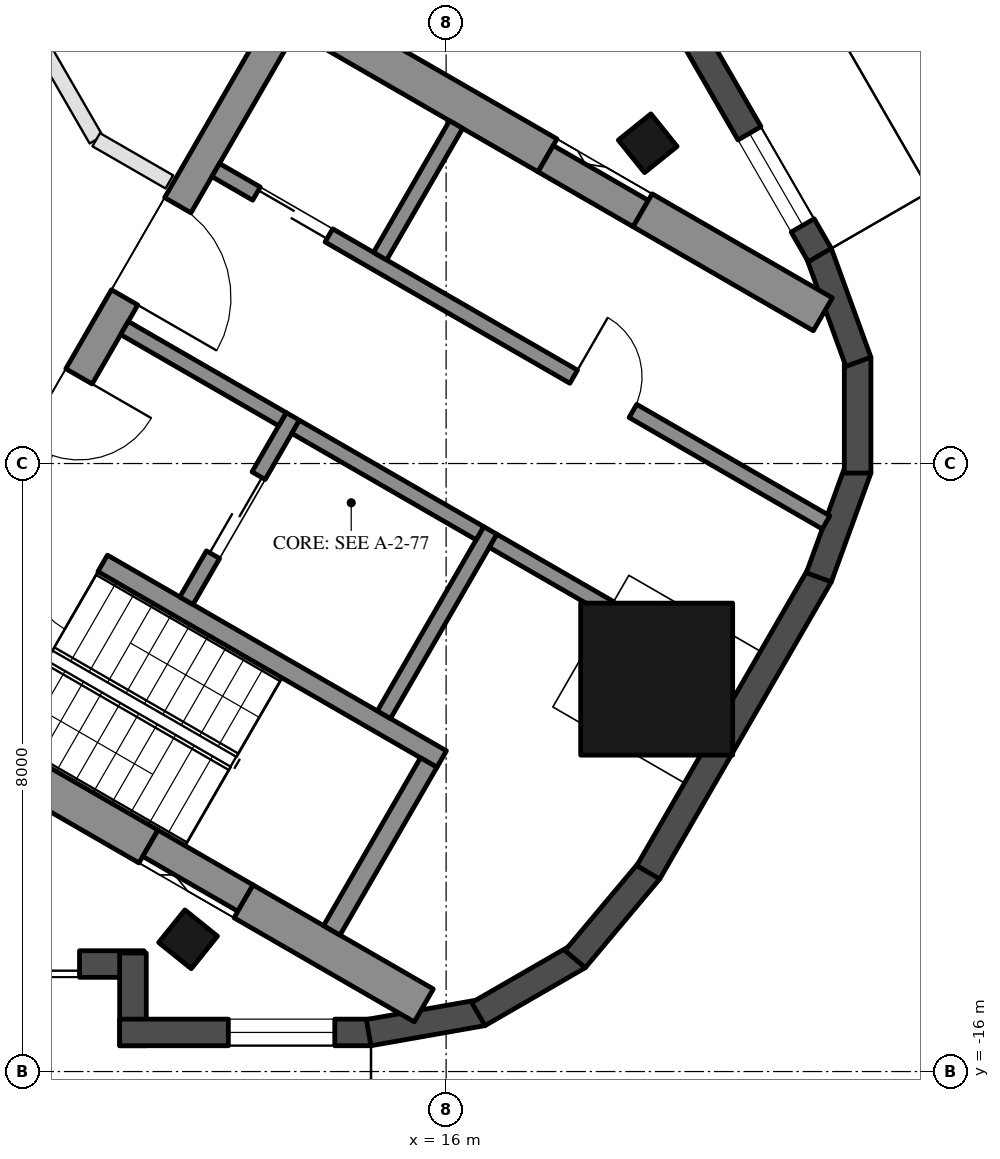
"""IFC4 building model, lengths in metres.
Left out: names, types, materials, properties, quantities, classifications, styles, units other than length and angle.
Written with IfcOpenShell. Run it as: python <this file> out.ifc"""

import sys

from ifc_helpers import new_model, si_unit, direction, frame, frame_2d, origin, origin_2d, place, context, subcontext, project, spatial, rectangle, hollow_rectangle, extrude, boolean, halfspace, element, fill, save


model = new_model("IFC4")
c1 = context("Model", 3, precision=1e-05, world=origin(), true_north=direction((0.0, 1.0)))
c2 = subcontext(c1, "Body", "Model", "MODEL_VIEW")
j1 = project(units=[si_unit("LENGTHUNIT", "METRE"), si_unit("PLANEANGLEUNIT", "RADIAN")], contexts=[c1])
p1 = place(None, origin())
s1 = spatial("IfcSite", under=j1, at=p1, CompositionType="ELEMENT")
p2 = place(p1, origin())
s2 = spatial("IfcBuilding", under=s1, at=p2, CompositionType="ELEMENT")
p3 = place(p2, frame((0.0, 0.0, 328.1)))
s3 = spatial("IfcBuildingStorey", under=s2, at=p3, CompositionType="ELEMENT", Elevation=328.1)
p4 = place(p3, frame((12.605, -14.26, 0.0), z_axis=(-0.121069901949, 0.150398600122, 0.981184151892), x_axis=(0.992601568988, 0.00920533993, 0.121067695767)))
e1 = element("IfcColumn", 1, at=p4, inside=s3, PredefinedType="COLUMN", context=c2, shape_type="SweptSolid", body=[
    boolean("DIFFERENCE", boolean("DIFFERENCE", extrude(hollow_rectangle(XDim=0.55, YDim=0.55, WallThickness=0.025, at=origin_2d()), origin(), (0.0, 0.0, 1.0), 3.771), halfspace(frame((0.0, 0.0, 0.04), z_axis=(0.0, 0.0, 1.0), x_axis=(1.0, 0.0, 0.0)), True)), halfspace(frame((0.0, 0.0, 3.753), z_axis=(0.0, 0.0, 1.0), x_axis=(1.0, 0.0, 0.0)), False)),
])
p5 = place(p3, frame((18.652, -3.786, 0.0), z_axis=(-0.190735837279, 0.02958801006, 0.981195388309), x_axis=(0.488607938484, -0.864067297741, 0.121037132421)))
e2 = element("IfcColumn", 2, at=p5, inside=s3, PredefinedType="COLUMN", context=c2, shape_type="SweptSolid", body=[
    boolean("DIFFERENCE", boolean("DIFFERENCE", extrude(hollow_rectangle(XDim=0.55, YDim=0.55, WallThickness=0.025, at=origin_2d()), origin(), (0.0, 0.0, 1.0), 3.771), halfspace(frame((0.0, 0.0, 0.04), z_axis=(0.0, 0.0, 1.0), x_axis=(1.0, 0.0, 0.0)), True)), halfspace(frame((0.0, 0.0, 3.753), z_axis=(0.0, 0.0, 1.0), x_axis=(1.0, 0.0, 0.0)), False)),
])
p6 = place(p3, frame((18.77, -10.837, 0.0), z_axis=(-0.190346159062, 0.109881938965, 0.975548204457), x_axis=(0.499994868029, 0.866028366632, 1.1507946e-05)))
e3 = element("IfcColumn", 3, at=p6, inside=s3, PredefinedType="COLUMN", context=c2, shape_type="SweptSolid", body=[
    boolean("DIFFERENCE", boolean("DIFFERENCE", extrude(hollow_rectangle(XDim=2.0, YDim=2.0, WallThickness=0.05, at=origin_2d()), origin(), (0.0, 0.0, 1.0), 3.793), halfspace(frame((0.0, 0.0, 0.113), z_axis=(0.0, 0.0, 1.0), x_axis=(1.0, 0.0, 0.0)), True)), halfspace(frame((0.0, 0.0, 3.744), z_axis=(0.0, 0.0, 1.0), x_axis=(1.0, 0.0, 0.0)), False)),
])
p7 = place(p3, frame((6.882, -14.585, 0.0), z_axis=(0.0, 0.0, 1.0), x_axis=(1.0, 0.0, 0.0)))
e4 = element("IfcWall", 4, at=p7, inside=s3, PredefinedType="SOLIDWALL", context=c2, shape_type="SweptSolid", body=[
    extrude(rectangle(XDim=5.143, YDim=0.35, at=frame_2d((2.571, 0.0))), origin(), (0.0, 0.0, 1.0), 3.45),
])
p8 = place(p7, frame((1.894, 0.0, 0.0)))
e5 = element("IfcOpeningElement", 5, at=p8, cuts=e4, PredefinedType="OPENING", context=c2, shape_type="SweptSolid", body=[
    extrude(rectangle(XDim=2.4, YDim=2.4, at=frame_2d((1.2, 1.2))), frame((0.0, 0.185, 0.0), z_axis=(0.0, -1.0, 0.0), x_axis=(1.0, 0.0, 0.0)), (0.0, 0.0, 1.0), 0.37),
])
p9 = place(p3, frame((11.88, -14.44, 0.0), z_axis=(0.0, 0.0, 1.0), x_axis=(0.0, -1.0, 0.0)))
e6 = element("IfcWall", 6, at=p9, inside=s3, PredefinedType="SOLIDWALL", context=c2, shape_type="SweptSolid", body=[
    extrude(rectangle(XDim=1.22, YDim=0.35, at=frame_2d((0.61, 0.0))), origin(), (0.0, 0.0, 1.0), 3.45),
])
p10 = place(p3, frame((11.705, -15.485, 0.0), z_axis=(0.0, 0.0, 1.0), x_axis=(1.0, 0.0, 0.0)))
e7 = element("IfcWall", 7, at=p10, inside=s3, PredefinedType="SOLIDWALL", context=c2, shape_type="SweptSolid", body=[
    extrude(rectangle(XDim=3.306, YDim=0.35, at=frame_2d((1.653, 0.0))), origin(), (0.0, 0.0, 1.0), 3.45),
])
p11 = place(p10, frame((1.43, 0.0, 0.3)))
e8 = element("IfcOpeningElement", 8, at=p11, cuts=e7, PredefinedType="OPENING", context=c2, shape_type="SweptSolid", body=[
    extrude(rectangle(XDim=1.4, YDim=2.65, at=frame_2d((0.7, 1.325))), frame((0.0, 0.185, 0.0), z_axis=(0.0, -1.0, 0.0), x_axis=(1.0, 0.0, 0.0)), (0.0, 0.0, 1.0), 0.37),
])
for number, where, z_axis, x_axis in (
    (9, (14.98, -15.488, 0.0), (0.0, 0.0, 1.0), (0.985, 0.174, 0.0)),
    (10, (16.424, -15.244, 0.0), (0.0, 0.0, 1.0), (0.866, 0.5, 0.0)),
):
    element("IfcWall", number, at=place(p3, frame(where, z_axis=z_axis, x_axis=x_axis)), inside=s3, PredefinedType="SOLIDWALL", context=c2, shape_type="SweptSolid", body=[
        extrude(rectangle(XDim=1.524, YDim=0.35, at=frame_2d((0.762, 0.0))), origin(), (0.0, 0.0, 1.0), 3.45),
    ])
p12 = place(p3, frame((17.697, -14.521, 0.0), z_axis=(0.0, 0.0, 1.0), x_axis=(0.642812493629, 0.766023562323, 0.0)))
e11 = element("IfcWall", 11, at=p12, inside=s3, PredefinedType="SOLIDWALL", context=c2, shape_type="SweptSolid", body=[
    extrude(rectangle(XDim=1.524, YDim=0.35, at=frame_2d((0.762, 0.0))), origin(), (0.0, 0.0, 1.0), 3.45),
])
p13 = place(p3, frame((18.659, -13.379, 0.0), z_axis=(0.0, 0.0, 1.0), x_axis=(0.500042384281, 0.866000931825, 0.0)))
e12 = element("IfcWall", 12, at=p13, inside=s3, PredefinedType="SOLIDWALL", context=c2, shape_type="SweptSolid", body=[
    extrude(rectangle(XDim=4.514, YDim=0.35, at=frame_2d((2.257, 0.0))), origin(), (0.0, 0.0, 1.0), 3.45),
])
for number, where, z_axis, x_axis in (
    (13, (20.903, -9.498, 0.0), (0.0, 0.0, 1.0), (0.342, 0.94, 0.0)),
    (14, (21.414, -8.125, 0.0), (0.0, 0.0, 1.0), (0.0, 1.0, 0.0)),
    (15, (21.425, -6.662, 0.0), (0.0, 0.0, 1.0), (-0.342, 0.94, 0.0)),
):
    element("IfcWall", number, at=place(p3, frame(where, z_axis=z_axis, x_axis=x_axis)), inside=s3, PredefinedType="SOLIDWALL", context=c2, shape_type="SweptSolid", body=[
        extrude(rectangle(XDim=1.524, YDim=0.35, at=frame_2d((0.762, 0.0))), origin(), (0.0, 0.0, 1.0), 3.45),
    ])
p14 = place(p3, frame((20.916, -5.257, 0.0), z_axis=(0.0, 0.0, 1.0), x_axis=(-0.500022310942, 0.866012522173, 0.0)))
e16 = element("IfcWall", 16, at=p14, inside=s3, PredefinedType="SOLIDWALL", context=c2, shape_type="SweptSolid", body=[
    extrude(rectangle(XDim=9.608, YDim=0.35, at=frame_2d((4.804, 0.0))), origin(), (0.0, 0.0, 1.0), 3.45),
])
p15 = place(p14, frame((0.45, 0.0, 0.3)))
e17 = element("IfcOpeningElement", 17, at=p15, cuts=e16, PredefinedType="OPENING", context=c2, shape_type="SweptSolid", body=[
    extrude(rectangle(XDim=1.4, YDim=2.65, at=frame_2d((0.7, 1.325))), frame((0.0, 0.185, 0.0), z_axis=(0.0, -1.0, 0.0), x_axis=(1.0, 0.0, 0.0)), (0.0, 0.0, 1.0), 0.37),
])
p16 = place(p14, frame((5.68, 0.0, 0.0)))
e18 = element("IfcOpeningElement", 18, at=p16, cuts=e16, PredefinedType="OPENING", context=c2, shape_type="SweptSolid", body=[
    extrude(rectangle(XDim=2.4, YDim=2.4, at=frame_2d((1.2, 1.2))), frame((0.0, 0.185, 0.0), z_axis=(0.0, -1.0, 0.0), x_axis=(1.0, 0.0, 0.0)), (0.0, 0.0, 1.0), 0.37),
])
p17 = place(p14, frame((3.492, 0.0, 0.3)))
e19 = element("IfcOpeningElement", 19, at=p17, cuts=e16, PredefinedType="OPENING", context=c2, shape_type="SweptSolid", body=[
    extrude(rectangle(XDim=1.8, YDim=2.65, at=frame_2d((0.9, 1.325))), frame((0.0, 0.185, 0.0), z_axis=(0.0, -1.0, 0.0), x_axis=(1.0, 0.0, 0.0)), (0.0, 0.0, 1.0), 0.37),
])
p18 = place(p3, frame((8.547, -10.997, 0.0), z_axis=(0.0, 0.0, 1.0), x_axis=(0.866031306094, -0.49998977676, 0.0)))
e20 = element("IfcWall", 20, at=p18, inside=s3, PredefinedType="SHEAR", context=c2, shape_type="SweptSolid", body=[
    extrude(rectangle(XDim=4.084, YDim=0.5, at=frame_2d((2.042, 0.0))), origin(), (0.0, 0.0, 1.0), 3.45),
])
p19 = place(p3, frame((12.109, -12.996, 0.0), z_axis=(0.0, 0.0, 1.0), x_axis=(0.865977303747, -0.500083302456, 0.0)))
e21 = element("IfcWall", 21, at=p19, inside=s3, PredefinedType="SHEAR", context=c2, shape_type="SweptSolid", body=[
    extrude(rectangle(XDim=1.445, YDim=0.4, at=frame_2d((0.722, 0.0))), origin(), (0.0, 0.0, 1.0), 3.45),
])
p20 = place(p3, frame((13.335, -13.761, 0.0), z_axis=(0.0, 0.0, 1.0), x_axis=(0.866034122891, -0.49998489776, 0.0)))
e22 = element("IfcWall", 22, at=p20, inside=s3, PredefinedType="SHEAR", context=c2, shape_type="SweptSolid", body=[
    extrude(rectangle(XDim=2.738, YDim=0.5, at=frame_2d((1.369, 0.0))), origin(), (0.0, 0.0, 1.0), 3.45),
])
p21 = place(p3, frame((13.797, -1.903, 0.0), z_axis=(0.0, 0.0, 1.0), x_axis=(0.866020367552, -0.500008722908, 0.0)))
e23 = element("IfcWall", 23, at=p21, inside=s3, PredefinedType="SHEAR", context=c2, shape_type="SweptSolid", body=[
    extrude(rectangle(XDim=4.085, YDim=0.5, at=frame_2d((2.042, 0.0))), origin(), (0.0, 0.0, 1.0), 3.45),
])
p22 = place(p3, frame((17.309, -3.989, 0.0), z_axis=(0.0, 0.0, 1.0), x_axis=(0.866092727722, -0.499883373386, 0.0)))
e24 = element("IfcWall", 24, at=p22, inside=s3, PredefinedType="SHEAR", context=c2, shape_type="SweptSolid", body=[
    extrude(rectangle(XDim=1.445, YDim=0.4, at=frame_2d((0.722, 0.0))), origin(), (0.0, 0.0, 1.0), 3.45),
])
p23 = place(p3, frame((18.585, -4.668, 0.0), z_axis=(0.0, 0.0, 1.0), x_axis=(0.866034122891, -0.49998489776, 0.0)))
e25 = element("IfcWall", 25, at=p23, inside=s3, PredefinedType="SHEAR", context=c2, shape_type="SweptSolid", body=[
    extrude(rectangle(XDim=2.738, YDim=0.5, at=frame_2d((1.369, 0.0))), origin(), (0.0, 0.0, 1.0), 3.45),
])
p24 = place(p3, frame((8.845, -10.88, 0.0), z_axis=(0.0, 0.0, 1.0), x_axis=(0.500004234368, 0.866022959057, 0.0)))
e26 = element("IfcWall", 26, at=p24, inside=s3, PredefinedType="SHEAR", context=c2, shape_type="SweptSolid", body=[
    extrude(rectangle(XDim=10.0, YDim=0.4, at=frame_2d((5.0, 0.0))), origin(), (0.0, 0.0, 1.0), 3.45),
])
p25 = place(p24, frame((3.55, 0.0, 0.0)))
e27 = element("IfcOpeningElement", 27, at=p25, cuts=e26, PredefinedType="OPENING", context=c2, shape_type="SweptSolid", body=[
    extrude(rectangle(XDim=1.1, YDim=2.1, at=frame_2d((0.55, 1.05))), frame((0.0, 0.21, 0.0), z_axis=(0.0, -1.0, 0.0), x_axis=(1.0, 0.0, 0.0)), (0.0, 0.0, 1.0), 0.42),
])
p26 = place(p24, frame((5.85, 0.0, 0.0)))
e28 = element("IfcOpeningElement", 28, at=p26, cuts=e26, PredefinedType="OPENING", context=c2, shape_type="SweptSolid", body=[
    extrude(rectangle(XDim=1.4, YDim=2.1, at=frame_2d((0.7, 1.05))), frame((0.0, 0.21, 0.0), z_axis=(0.0, -1.0, 0.0), x_axis=(1.0, 0.0, 0.0)), (0.0, 0.0, 1.0), 0.42),
])
p27 = place(p3, frame((10.356, -8.664, 0.0), z_axis=(0.0, 0.0, 1.0), x_axis=(0.866028629588, -0.499994412703, 0.0)))
e29 = element("IfcWall", 29, at=p27, inside=s3, PredefinedType="SHEAR", context=c2, shape_type="SweptSolid", body=[
    extrude(rectangle(XDim=6.45, YDim=0.25, at=frame_2d((3.225, 0.0))), origin(), (0.0, 0.0, 1.0), 3.45),
])
p28 = place(p27, frame((0.3, 0.0, 0.0)))
e30 = element("IfcOpeningElement", 30, at=p28, cuts=e29, PredefinedType="OPENING", context=c2, shape_type="SweptSolid", body=[
    extrude(rectangle(XDim=1.0, YDim=2.1, at=frame_2d((0.5, 1.05))), frame((0.0, 0.135, 0.0), z_axis=(0.0, -1.0, 0.0), x_axis=(1.0, 0.0, 0.0)), (0.0, 0.0, 1.0), 0.27),
])
p29 = place(p3, frame((14.496, -14.143, 0.0), z_axis=(0.0, 0.0, 1.0), x_axis=(0.500062241894, 0.865989465428, 0.0)))
e31 = element("IfcWall", 31, at=p29, inside=s3, PredefinedType="SHEAR", context=c2, shape_type="SweptSolid", body=[
    extrude(rectangle(XDim=2.55, YDim=0.25, at=frame_2d((1.275, 0.0))), origin(), (0.0, 0.0, 1.0), 3.45),
])
p30 = place(p3, frame((15.181, -11.305, 0.0), z_axis=(0.0, 0.0, 1.0), x_axis=(0.49994636267, 0.866056369097, 0.0)))
e32 = element("IfcWall", 32, at=p30, inside=s3, PredefinedType="SHEAR", context=c2, shape_type="SweptSolid", body=[
    extrude(rectangle(XDim=2.8, YDim=0.2, at=frame_2d((1.4, 0.0))), origin(), (0.0, 0.0, 1.0), 3.45),
])
p31 = place(p3, frame((12.583, -9.805, 0.0), z_axis=(0.0, 0.0, 1.0), x_axis=(0.49994636267, 0.866056369097, 0.0)))
e33 = element("IfcWall", 33, at=p31, inside=s3, PredefinedType="SHEAR", context=c2, shape_type="SweptSolid", body=[
    extrude(rectangle(XDim=2.8, YDim=0.2, at=frame_2d((1.4, 0.0))), origin(), (0.0, 0.0, 1.0), 3.45),
])
p32 = place(p31, frame((0.7, 0.0, 0.0)))
e34 = element("IfcOpeningElement", 34, at=p32, cuts=e33, PredefinedType="OPENING", context=c2, shape_type="SweptSolid", body=[
    extrude(rectangle(XDim=1.2, YDim=2.1, at=frame_2d((0.6, 1.05))), frame((0.0, 0.11, 0.0), z_axis=(0.0, -1.0, 0.0), x_axis=(1.0, 0.0, 0.0)), (0.0, 0.0, 1.0), 0.22),
])
p33 = place(p3, frame((11.768, -6.217, 0.0), z_axis=(0.0, 0.0, 1.0), x_axis=(0.866050077142, -0.499957262057, 0.0)))
e35 = element("IfcWall", 35, at=p33, inside=s3, PredefinedType="SHEAR", context=c2, shape_type="SweptSolid", body=[
    extrude(rectangle(XDim=2.4, YDim=0.2, at=frame_2d((1.2, 0.0))), origin(), (0.0, 0.0, 1.0), 3.45),
])
p34 = place(p3, frame((14.02, -7.517, 0.0), z_axis=(0.0, 0.0, 1.0), x_axis=(0.866034573852, -0.49998411664, 0.0)))
e36 = element("IfcWall", 36, at=p34, inside=s3, PredefinedType="SHEAR", context=c2, shape_type="SweptSolid", body=[
    extrude(rectangle(XDim=2.8, YDim=0.2, at=frame_2d((1.4, 0.0))), origin(), (0.0, 0.0, 1.0), 3.45),
])
p35 = place(p3, frame((12.968, -4.138, 0.0), z_axis=(0.0, 0.0, 1.0), x_axis=(0.866022923061, -0.500004296715, 0.0)))
e37 = element("IfcWall", 37, at=p35, inside=s3, PredefinedType="SHEAR", context=c2, shape_type="SweptSolid", body=[
    extrude(rectangle(XDim=9.273, YDim=0.2, at=frame_2d((4.636, 0.0))), origin(), (0.0, 0.0, 1.0), 3.45),
])
p36 = place(p35, frame((0.62, 0.0, 0.0)))
e38 = element("IfcOpeningElement", 38, at=p36, cuts=e37, PredefinedType="OPENING", context=c2, shape_type="SweptSolid", body=[
    extrude(rectangle(XDim=1.1, YDim=2.1, at=frame_2d((0.55, 1.05))), frame((0.0, 0.11, 0.0), z_axis=(0.0, -1.0, 0.0), x_axis=(1.0, 0.0, 0.0)), (0.0, 0.0, 1.0), 0.22),
])
p37 = place(p35, frame((5.439, 0.0, 0.0)))
e39 = element("IfcOpeningElement", 39, at=p37, cuts=e37, PredefinedType="OPENING", context=c2, shape_type="SweptSolid", body=[
    extrude(rectangle(XDim=0.9, YDim=2.1, at=frame_2d((0.45, 1.05))), frame((0.0, 0.11, 0.0), z_axis=(0.0, -1.0, 0.0), x_axis=(1.0, 0.0, 0.0)), (0.0, 0.0, 1.0), 0.22),
])
p38 = place(p3, frame((16.618, -9.017, 0.0), z_axis=(0.0, 0.0, 1.0), x_axis=(0.866066400931, -0.499928984136, 0.0)))
e40 = element("IfcWall", 40, at=p38, inside=s3, PredefinedType="SHEAR", context=c2, shape_type="SweptSolid", body=[
    extrude(rectangle(XDim=1.774, YDim=0.2, at=frame_2d((0.887, 0.0))), origin(), (0.0, 0.0, 1.0), 3.45),
])
p39 = place(p3, frame((15.131, -5.272, 0.0), z_axis=(0.0, 0.0, 1.0), x_axis=(0.499972520799, 0.866041268327, 0.0)))
e41 = element("IfcWall", 41, at=p39, inside=s3, PredefinedType="SHEAR", context=c2, shape_type="SweptSolid", body=[
    extrude(rectangle(XDim=2.0, YDim=0.2, at=frame_2d((1.0, 0.0))), origin(), (0.0, 0.0, 1.0), 3.45),
])
p40 = place(p3, frame((8.781, 0.79, 0.0), z_axis=(0.0, 0.0, 1.0), x_axis=(0.499999923186, -0.866025448133, 0.0)))
e42 = element("IfcWall", 42, at=p40, inside=s3, PredefinedType="PARTITIONING", context=c2, shape_type="SweptSolid", body=[
    extrude(rectangle(XDim=5.23, YDim=0.2, at=frame_2d((2.615, 0.0))), origin(), (0.0, 0.0, 1.0), 3.05),
])
p41 = place(p40, frame((2.115, 0.0, 0.0)))
e43 = element("IfcOpeningElement", 43, at=p41, cuts=e42, PredefinedType="OPENING", context=c2, shape_type="SweptSolid", body=[
    extrude(rectangle(XDim=1.0, YDim=2.1, at=frame_2d((0.5, 1.05))), frame((0.0, 0.11, 0.0), z_axis=(0.0, -1.0, 0.0), x_axis=(1.0, 0.0, 0.0)), (0.0, 0.0, 1.0), 0.22),
])
p42 = place(p3, frame((11.396, -3.739, 0.0), z_axis=(0.0, 0.0, 1.0), x_axis=(0.866002566612, -0.500039553057, 0.0)))
e44 = element("IfcWall", 44, at=p42, inside=s3, PredefinedType="PARTITIONING", context=c2, shape_type="SweptSolid", body=[
    extrude(rectangle(XDim=1.111, YDim=0.2, at=frame_2d((0.555, 0.0))), origin(), (0.0, 0.0, 1.0), 3.45),
])
p43 = place(p8, frame((2.4, 0.0, 0.0), z_axis=(0.0, 0.0, 1.0), x_axis=(-1.0, 0.0, 0.0)))
e45 = element("IfcDoor", 45, at=p43, inside=s3, OperationType="SLIDING_TO_LEFT", PredefinedType="DOOR", context=c2, shape_type="SweptSolid", body=[
    extrude(rectangle(XDim=2.4, YDim=2.4, at=frame_2d((1.2, 1.2))), frame((0.0, 0.025, 0.0), z_axis=(0.0, -1.0, 0.0), x_axis=(1.0, 0.0, 0.0)), (0.0, 0.0, 1.0), 0.05),
])
fill(e5, e45)
p44 = place(p11, origin())
e46 = element("IfcWindow", 46, at=p44, inside=s3, PartitioningType="SINGLE_PANEL", PredefinedType="WINDOW", context=c2, shape_type="SweptSolid", body=[
    extrude(rectangle(XDim=1.4, YDim=2.65, at=frame_2d((0.7, 1.325))), frame((0.0, 0.03, 0.0), z_axis=(0.0, -1.0, 0.0), x_axis=(1.0, 0.0, 0.0)), (0.0, 0.0, 1.0), 0.06),
])
fill(e8, e46)
p45 = place(p15, origin())
e47 = element("IfcWindow", 47, at=p45, inside=s3, PartitioningType="SINGLE_PANEL", PredefinedType="WINDOW", context=c2, shape_type="SweptSolid", body=[
    extrude(rectangle(XDim=1.4, YDim=2.65, at=frame_2d((0.7, 1.325))), frame((0.0, 0.03, 0.0), z_axis=(0.0, -1.0, 0.0), x_axis=(1.0, 0.0, 0.0)), (0.0, 0.0, 1.0), 0.06),
])
fill(e17, e47)
p46 = place(p32, origin())
e48 = element("IfcDoor", 48, at=p46, inside=s3, OperationType="DOUBLE_DOOR_SLIDING", PredefinedType="DOOR", context=c2, shape_type="SweptSolid", body=[
    extrude(rectangle(XDim=1.2, YDim=2.1, at=frame_2d((0.6, 1.05))), frame((0.0, 0.025, 0.0), z_axis=(0.0, -1.0, 0.0), x_axis=(1.0, 0.0, 0.0)), (0.0, 0.0, 1.0), 0.05),
])
fill(e34, e48)
p47 = place(p36, origin())
e49 = element("IfcDoor", 49, at=p47, inside=s3, OperationType="DOUBLE_DOOR_SLIDING", PredefinedType="DOOR", context=c2, shape_type="SweptSolid", body=[
    extrude(rectangle(XDim=1.1, YDim=2.1, at=frame_2d((0.55, 1.05))), frame((0.0, 0.025, 0.0), z_axis=(0.0, -1.0, 0.0), x_axis=(1.0, 0.0, 0.0)), (0.0, 0.0, 1.0), 0.05),
])
fill(e38, e49)
p48 = place(p37, origin())
e50 = element("IfcDoor", 50, at=p48, inside=s3, OperationType="SINGLE_SWING_LEFT", PredefinedType="DOOR", context=c2, shape_type="SweptSolid", body=[
    extrude(rectangle(XDim=0.9, YDim=2.1, at=frame_2d((0.45, 1.05))), frame((0.0, 0.025, 0.0), z_axis=(0.0, -1.0, 0.0), x_axis=(1.0, 0.0, 0.0)), (0.0, 0.0, 1.0), 0.05),
])
fill(e39, e50)
p49 = place(p25, frame((1.1, 0.0, 0.0), z_axis=(0.0, 0.0, 1.0), x_axis=(-1.0, 0.0, 0.0)))
e51 = element("IfcDoor", 51, at=p49, inside=s3, OperationType="SINGLE_SWING_LEFT", PredefinedType="DOOR", context=c2, shape_type="SweptSolid", body=[
    extrude(rectangle(XDim=1.1, YDim=2.1, at=frame_2d((0.55, 1.05))), frame((0.0, 0.025, 0.0), z_axis=(0.0, -1.0, 0.0), x_axis=(1.0, 0.0, 0.0)), (0.0, 0.0, 1.0), 0.05),
])
fill(e27, e51)
p50 = place(p26, frame((1.4, 0.0, 0.0), z_axis=(0.0, 0.0, 1.0), x_axis=(-1.0, 0.0, 0.0)))
e52 = element("IfcDoor", 52, at=p50, inside=s3, OperationType="DOUBLE_DOOR_SINGLE_SWING", PredefinedType="DOOR", context=c2, shape_type="SweptSolid", body=[
    extrude(rectangle(XDim=1.4, YDim=2.1, at=frame_2d((0.7, 1.05))), frame((0.0, 0.025, 0.0), z_axis=(0.0, -1.0, 0.0), x_axis=(1.0, 0.0, 0.0)), (0.0, 0.0, 1.0), 0.05),
])
fill(e28, e52)
p51 = place(p28, frame((1.0, 0.0, 0.0), z_axis=(0.0, 0.0, 1.0), x_axis=(-1.0, 0.0, 0.0)))
e53 = element("IfcDoor", 53, at=p51, inside=s3, OperationType="SINGLE_SWING_LEFT", PredefinedType="DOOR", context=c2, shape_type="SweptSolid", body=[
    extrude(rectangle(XDim=1.0, YDim=2.1, at=frame_2d((0.5, 1.05))), frame((0.0, 0.025, 0.0), z_axis=(0.0, -1.0, 0.0), x_axis=(1.0, 0.0, 0.0)), (0.0, 0.0, 1.0), 0.05),
])
fill(e30, e53)
save(model, sys.argv[1])
